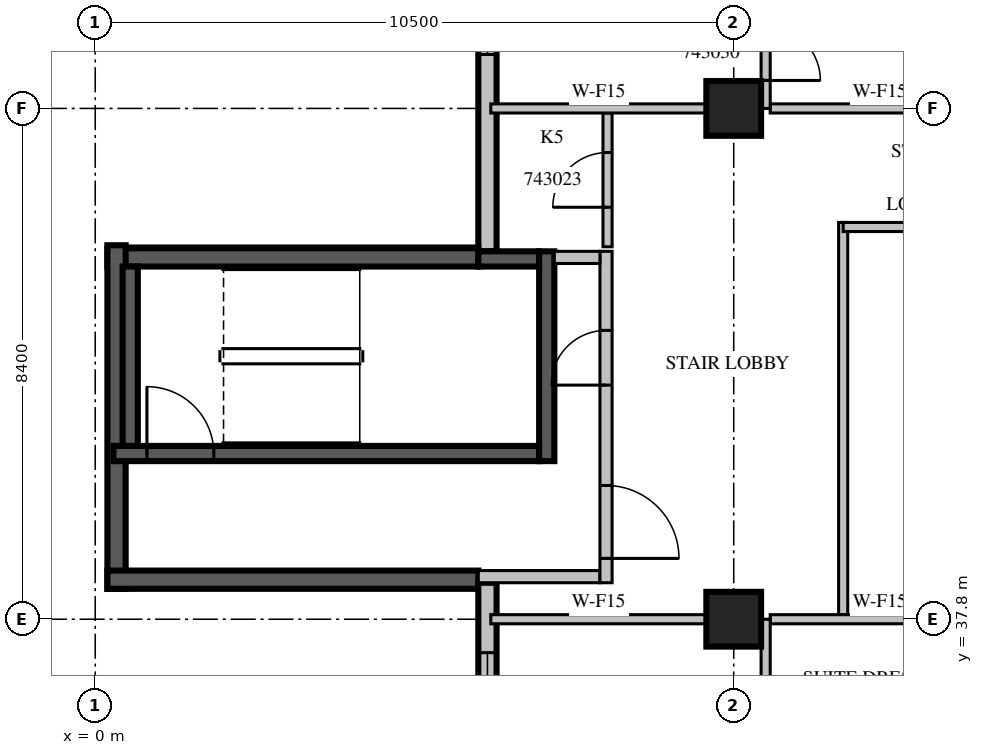
"""IFC4 building model, lengths in metres.
Left out: names, types, materials, properties, quantities, classifications, styles, units other than length and angle.
Written with IfcOpenShell. Run it as: python <this file> out.ifc"""

import sys

from ifc_helpers import new_model, si_unit, direction, frame, frame_2d, origin, origin_2d, place, context, subcontext, project, spatial, rectangle, extrude, source, transform, mapped, element, fill, save


model = new_model("IFC4")
c1 = context("Model", 3, precision=1e-05, world=origin(), true_north=direction((0.0, 1.0)))
c2 = subcontext(c1, "Body", "Model", "MODEL_VIEW")
j1 = project(units=[si_unit("LENGTHUNIT", "METRE"), si_unit("PLANEANGLEUNIT", "RADIAN")], contexts=[c1])
p1 = place(None, origin())
s1 = spatial("IfcSite", under=j1, at=p1, CompositionType="ELEMENT")
p2 = place(p1, origin())
s2 = spatial("IfcBuilding", under=s1, at=p2, CompositionType="ELEMENT")
p3 = place(p2, frame((0.0, 0.0, 196.8)))
s3 = spatial("IfcBuildingStorey", under=s2, at=p3, CompositionType="ELEMENT", Elevation=196.8)
m1 = source(origin(), c2, "Body", "SweptSolid", [
    extrude(rectangle(XDim=0.9, YDim=0.9, at=origin_2d()), origin(), (0.0, 0.0, 1.0), 3.8),
])
for number, where, z_axis, x_axis in (
    (1, (10.5, 37.8, 0.0), (0.0, 0.0, 1.0), (1.0, 0.0, 0.0)),
    (2, (10.5, 46.2, 0.0), (0.0, 0.0, 1.0), (1.0, 0.0, 0.0)),
):
    element("IfcColumn", number, at=place(p3, frame(where, z_axis=z_axis, x_axis=x_axis)), inside=s3, PredefinedType="COLUMN", context=c2, shape_type="MappedRepresentation", body=[
        mapped(m1, transform((0.0, 0.0, 0.0), scale=1.0)),
    ])
m2 = source(origin(), c2, "Body", "SweptSolid", [
    extrude(rectangle(XDim=9.91, YDim=0.3, at=frame_2d((4.955, 0.0))), origin(), (0.0, 0.0, 1.0), 3.4),
])
p4 = place(p3, frame((6.45, 53.76, 0.0), z_axis=(0.0, 0.0, 1.0), x_axis=(0.0, -1.0, 0.0)))
e3 = element("IfcWall", 3, at=p4, inside=s3, PredefinedType="STANDARD", context=c2, shape_type="MappedRepresentation", body=[
    mapped(m2, transform((0.0, 0.0, 0.0), scale=1.0)),
])
m3 = source(origin(), c2, "Body", "SweptSolid", [
    extrude(rectangle(XDim=2.4, YDim=2.3, at=frame_2d((1.2, 1.15))), frame((0.0, 0.16, 0.0), z_axis=(0.0, -1.0, 0.0), x_axis=(1.0, 0.0, 0.0)), (0.0, 0.0, 1.0), 0.32),
])
p5 = place(p4, frame((4.272, 0.0, 0.6)))
e4 = element("IfcOpeningElement", 4, at=p5, cuts=e3, PredefinedType="OPENING", context=c2, shape_type="MappedRepresentation", body=[
    mapped(m3, transform((0.0, 0.0, 0.0), scale=1.0)),
])
p6 = place(p4, frame((0.936, 0.0, 0.6)))
e5 = element("IfcOpeningElement", 5, at=p6, cuts=e3, PredefinedType="OPENING", context=c2, shape_type="MappedRepresentation", body=[
    mapped(m3, transform((0.0, 0.0, 0.0), scale=1.0)),
])
m4 = source(origin(), c2, "Body", "SweptSolid", [
    extrude(rectangle(XDim=6.1, YDim=0.3, at=frame_2d((3.05, 0.0))), origin(), (0.0, 0.0, 1.0), 3.4),
])
p7 = place(p3, frame((6.3, 43.75, 0.0), z_axis=(0.0, 0.0, 1.0), x_axis=(-1.0, 0.0, 0.0)))
e6 = element("IfcWall", 6, at=p7, inside=s3, PredefinedType="SOLIDWALL", context=c2, shape_type="MappedRepresentation", body=[
    mapped(m4, transform((0.0, 0.0, 0.0), scale=1.0)),
])
m5 = source(origin(), c2, "Body", "SweptSolid", [
    extrude(rectangle(XDim=5.65, YDim=0.3, at=frame_2d((2.825, 0.0))), origin(), (0.0, 0.0, 1.0), 3.4),
])
p8 = place(p3, frame((0.35, 43.95, 0.0), z_axis=(0.0, 0.0, 1.0), x_axis=(0.0, -1.0, 0.0)))
e7 = element("IfcWall", 7, at=p8, inside=s3, PredefinedType="SOLIDWALL", context=c2, shape_type="MappedRepresentation", body=[
    mapped(m5, transform((0.0, 0.0, 0.0), scale=1.0)),
])
p9 = place(p3, frame((0.2, 38.45, 0.0), z_axis=(0.0, 0.0, 1.0), x_axis=(1.0, 0.0, 0.0)))
e8 = element("IfcWall", 8, at=p9, inside=s3, PredefinedType="SOLIDWALL", context=c2, shape_type="MappedRepresentation", body=[
    mapped(m4, transform((0.0, 0.0, 0.0), scale=1.0)),
])
m6 = source(origin(), c2, "Body", "SweptSolid", [
    extrude(rectangle(XDim=16.6, YDim=0.3, at=frame_2d((8.3, 0.0))), origin(), (0.0, 0.0, 1.0), 3.4),
])
p10 = place(p3, frame((6.45, 38.4, 0.0), z_axis=(0.0, 0.0, 1.0), x_axis=(0.0, -1.0, 0.0)))
e9 = element("IfcWall", 9, at=p10, inside=s3, PredefinedType="STANDARD", context=c2, shape_type="MappedRepresentation", body=[
    mapped(m6, transform((0.0, 0.0, 0.0), scale=1.0)),
])
m7 = source(origin(), c2, "Body", "SweptSolid", [
    extrude(rectangle(XDim=1.8, YDim=2.3, at=frame_2d((0.9, 1.15))), frame((0.0, 0.16, 0.0), z_axis=(0.0, -1.0, 0.0), x_axis=(1.0, 0.0, 0.0)), (0.0, 0.0, 1.0), 0.32),
])
p11 = place(p10, frame((1.15, 0.0, 0.6)))
e10 = element("IfcOpeningElement", 10, at=p11, cuts=e9, PredefinedType="OPENING", context=c2, shape_type="MappedRepresentation", body=[
    mapped(m7, transform((0.0, 0.0, 0.0), scale=1.0)),
])
p12 = place(p10, frame((9.438, 0.0, 0.6)))
e11 = element("IfcOpeningElement", 11, at=p12, cuts=e9, PredefinedType="OPENING", context=c2, shape_type="MappedRepresentation", body=[
    mapped(m7, transform((0.0, 0.0, 0.0), scale=1.0)),
])
m8 = source(origin(), c2, "Body", "SweptSolid", [
    extrude(rectangle(XDim=1.2, YDim=2.3, at=frame_2d((0.6, 1.15))), frame((0.0, 0.16, 0.0), z_axis=(0.0, -1.0, 0.0), x_axis=(1.0, 0.0, 0.0)), (0.0, 0.0, 1.0), 0.32),
])
p13 = place(p10, frame((13.012, 0.0, 0.6)))
e12 = element("IfcOpeningElement", 12, at=p13, cuts=e9, PredefinedType="OPENING", context=c2, shape_type="MappedRepresentation", body=[
    mapped(m8, transform((0.0, 0.0, 0.0), scale=1.0)),
])
m9 = source(origin(), c2, "Body", "SweptSolid", [
    extrude(rectangle(XDim=1.0, YDim=2.1, at=frame_2d((0.5, 1.05))), frame((0.0, 0.16, 0.0), z_axis=(0.0, -1.0, 0.0), x_axis=(1.0, 0.0, 0.0)), (0.0, 0.0, 1.0), 0.32),
])
p14 = place(p10, frame((5.45, 0.0, 0.0)))
e13 = element("IfcOpeningElement", 13, at=p14, cuts=e9, PredefinedType="OPENING", context=c2, shape_type="MappedRepresentation", body=[
    mapped(m9, transform((0.0, 0.0, 0.0), scale=1.0)),
])
m10 = source(origin(), c2, "Body", "SweptSolid", [
    extrude(rectangle(XDim=7.0, YDim=0.25, at=frame_2d((3.5, 0.0))), origin(), (0.0, 0.0, 1.0), 3.4),
])
p15 = place(p3, frame((0.3, 40.525, 0.0), z_axis=(0.0, 0.0, 1.0), x_axis=(1.0, 0.0, 0.0)))
e14 = element("IfcWall", 14, at=p15, inside=s3, PredefinedType="SOLIDWALL", context=c2, shape_type="MappedRepresentation", body=[
    mapped(m10, transform((0.0, 0.0, 0.0), scale=1.0)),
])
m11 = source(origin(), c2, "Body", "SweptSolid", [
    extrude(rectangle(XDim=1.1, YDim=2.1, at=frame_2d((0.55, 1.05))), frame((0.0, 0.135, 0.0), z_axis=(0.0, -1.0, 0.0), x_axis=(1.0, 0.0, 0.0)), (0.0, 0.0, 1.0), 0.27),
])
p16 = place(p15, frame((0.55, 0.0, 0.0)))
e15 = element("IfcOpeningElement", 15, at=p16, cuts=e14, PredefinedType="OPENING", context=c2, shape_type="MappedRepresentation", body=[
    mapped(m11, transform((0.0, 0.0, 0.0), scale=1.0)),
])
m12 = source(origin(), c2, "Body", "SweptSolid", [
    extrude(rectangle(XDim=1.0, YDim=0.25, at=frame_2d((0.5, 0.0))), origin(), (0.0, 0.0, 1.0), 3.4),
])
p17 = place(p3, frame((6.3, 43.725, 0.0), z_axis=(0.0, 0.0, 1.0), x_axis=(1.0, 0.0, 0.0)))
e16 = element("IfcWall", 16, at=p17, inside=s3, PredefinedType="SOLIDWALL", context=c2, shape_type="MappedRepresentation", body=[
    mapped(m12, transform((0.0, 0.0, 0.0), scale=1.0)),
])
m13 = source(origin(), c2, "Body", "SweptSolid", [
    extrude(rectangle(XDim=3.45, YDim=0.25, at=frame_2d((1.725, 0.0))), origin(), (0.0, 0.0, 1.0), 3.4),
])
p18 = place(p3, frame((7.425, 40.4, 0.0), z_axis=(0.0, 0.0, 1.0), x_axis=(0.0, 1.0, 0.0)))
e17 = element("IfcWall", 17, at=p18, inside=s3, PredefinedType="SOLIDWALL", context=c2, shape_type="MappedRepresentation", body=[
    mapped(m13, transform((0.0, 0.0, 0.0), scale=1.0)),
])
m14 = source(origin(), c2, "Body", "SweptSolid", [
    extrude(rectangle(XDim=2.95, YDim=0.25, at=frame_2d((1.475, 0.0))), origin(), (0.0, 0.0, 1.0), 3.4),
])
p19 = place(p3, frame((0.575, 40.65, 0.0), z_axis=(0.0, 0.0, 1.0), x_axis=(0.0, 1.0, 0.0)))
e18 = element("IfcWall", 18, at=p19, inside=s3, PredefinedType="SOLIDWALL", context=c2, shape_type="MappedRepresentation", body=[
    mapped(m14, transform((0.0, 0.0, 0.0), scale=1.0)),
])
m15 = source(origin(), c2, "Body", "SweptSolid", [
    extrude(rectangle(XDim=2.0, YDim=0.2, at=frame_2d((1.0, 0.0))), origin(), (0.0, 0.0, 1.0), 3.4),
])
p20 = place(p3, frame((6.3, 38.5, 0.0), z_axis=(0.0, 0.0, 1.0), x_axis=(1.0, 0.0, 0.0)))
e19 = element("IfcWall", 19, at=p20, inside=s3, PredefinedType="PARTITIONING", context=c2, shape_type="MappedRepresentation", body=[
    mapped(m15, transform((0.0, 0.0, 0.0), scale=1.0)),
])
m16 = source(origin(), c2, "Body", "SweptSolid", [
    extrude(rectangle(XDim=5.45, YDim=0.2, at=frame_2d((2.725, 0.0))), origin(), (0.0, 0.0, 1.0), 3.4),
])
p21 = place(p3, frame((8.4, 38.4, 0.0), z_axis=(0.0, 0.0, 1.0), x_axis=(0.0, 1.0, 0.0)))
e20 = element("IfcWall", 20, at=p21, inside=s3, PredefinedType="PARTITIONING", context=c2, shape_type="MappedRepresentation", body=[
    mapped(m16, transform((0.0, 0.0, 0.0), scale=1.0)),
])
m17 = source(origin(), c2, "Body", "SweptSolid", [
    extrude(rectangle(XDim=1.2, YDim=2.1, at=frame_2d((0.6, 1.05))), frame((0.0, 0.11, 0.0), z_axis=(0.0, -1.0, 0.0), x_axis=(1.0, 0.0, 0.0)), (0.0, 0.0, 1.0), 0.22),
])
p22 = place(p21, frame((0.4, 0.0, 0.0)))
e21 = element("IfcOpeningElement", 21, at=p22, cuts=e20, PredefinedType="OPENING", context=c2, shape_type="MappedRepresentation", body=[
    mapped(m17, transform((0.0, 0.0, 0.0), scale=1.0)),
])
m18 = source(origin(), c2, "Body", "SweptSolid", [
    extrude(rectangle(XDim=0.9, YDim=2.1, at=frame_2d((0.45, 1.05))), frame((0.0, 0.11, 0.0), z_axis=(0.0, -1.0, 0.0), x_axis=(1.0, 0.0, 0.0)), (0.0, 0.0, 1.0), 0.22),
])
p23 = place(p21, frame((3.25, 0.0, 0.0)))
e22 = element("IfcOpeningElement", 22, at=p23, cuts=e20, PredefinedType="OPENING", context=c2, shape_type="MappedRepresentation", body=[
    mapped(m18, transform((0.0, 0.0, 0.0), scale=1.0)),
])
m19 = source(origin(), c2, "Body", "SweptSolid", [
    extrude(rectangle(XDim=0.75, YDim=0.2, at=frame_2d((0.375, 0.0))), origin(), (0.0, 0.0, 1.0), 3.4),
])
p24 = place(p3, frame((7.55, 43.75, 0.0), z_axis=(0.0, 0.0, 1.0), x_axis=(1.0, 0.0, 0.0)))
e23 = element("IfcWall", 23, at=p24, inside=s3, PredefinedType="PARTITIONING", context=c2, shape_type="MappedRepresentation", body=[
    mapped(m19, transform((0.0, 0.0, 0.0), scale=1.0)),
])
m20 = source(origin(), c2, "Body", "SweptSolid", [
    extrude(rectangle(XDim=6.45, YDim=0.15, at=frame_2d((3.225, 0.0))), origin(), (0.0, 0.0, 1.0), 3.4),
])
p25 = place(p3, frame((12.3, 44.325, 0.0), z_axis=(0.0, 0.0, 1.0), x_axis=(0.0, -1.0, 0.0)))
e24 = element("IfcWall", 24, at=p25, inside=s3, PredefinedType="PARTITIONING", context=c2, shape_type="MappedRepresentation", body=[
    mapped(m20, transform((0.0, 0.0, 0.0), scale=1.0)),
])
m21 = source(origin(), c2, "Body", "SweptSolid", [
    extrude(rectangle(XDim=2.475, YDim=0.15, at=frame_2d((1.238, 0.0))), origin(), (0.0, 0.0, 1.0), 3.4),
])
p26 = place(p3, frame((14.775, 44.25, 0.0), z_axis=(0.0, 0.0, 1.0), x_axis=(-1.0, 0.0, 0.0)))
e25 = element("IfcWall", 25, at=p26, inside=s3, PredefinedType="PARTITIONING", context=c2, shape_type="MappedRepresentation", body=[
    mapped(m21, transform((0.0, 0.0, 0.0), scale=1.0)),
])
m22 = source(origin(), c2, "Body", "SweptSolid", [
    extrude(rectangle(XDim=2.2, YDim=0.15, at=frame_2d((1.1, 0.0))), origin(), (0.0, 0.0, 1.0), 3.4),
])
p27 = place(p3, frame((8.425, 43.925, 0.0), z_axis=(0.0, 0.0, 1.0), x_axis=(0.0, 1.0, 0.0)))
e26 = element("IfcWall", 26, at=p27, inside=s3, PredefinedType="PARTITIONING", context=c2, shape_type="MappedRepresentation", body=[
    mapped(m22, transform((0.0, 0.0, 0.0), scale=1.0)),
])
m23 = source(origin(), c2, "Body", "SweptSolid", [
    extrude(rectangle(XDim=0.9, YDim=2.1, at=frame_2d((0.45, 1.05))), frame((0.0, 0.085, 0.0), z_axis=(0.0, -1.0, 0.0), x_axis=(1.0, 0.0, 0.0)), (0.0, 0.0, 1.0), 0.17),
])
p28 = place(p27, frame((0.65, 0.0, 0.0)))
e27 = element("IfcOpeningElement", 27, at=p28, cuts=e26, PredefinedType="OPENING", context=c2, shape_type="MappedRepresentation", body=[
    mapped(m23, transform((0.0, 0.0, 0.0), scale=1.0)),
])
m24 = source(origin(), c2, "Body", "SweptSolid", [
    extrude(rectangle(XDim=3.546, YDim=0.15, at=frame_2d((1.773, 0.0))), origin(), (0.0, 0.0, 1.0), 3.4),
])
p29 = place(p3, frame((10.051, 37.8, 0.0), z_axis=(0.0, 0.0, 1.0), x_axis=(-1.0, 0.0, 0.0)))
e28 = element("IfcWall", 28, at=p29, inside=s3, PredefinedType="PARTITIONING", context=c2, shape_type="MappedRepresentation", body=[
    mapped(m24, transform((0.0, 0.0, 0.0), scale=1.0)),
])
m25 = source(origin(), c2, "Body", "SweptSolid", [
    extrude(rectangle(XDim=3.6, YDim=0.15, at=frame_2d((1.8, 0.0))), origin(), (0.0, 0.0, 1.0), 3.4),
])
p30 = place(p3, frame((14.7, 37.8, 0.0), z_axis=(0.0, 0.0, 1.0), x_axis=(-1.0, 0.0, 0.0)))
e29 = element("IfcWall", 29, at=p30, inside=s3, PredefinedType="PARTITIONING", context=c2, shape_type="MappedRepresentation", body=[
    mapped(m25, transform((0.0, 0.0, 0.0), scale=1.0)),
])
m26 = source(origin(), c2, "Body", "SweptSolid", [
    extrude(rectangle(XDim=8.4, YDim=0.15, at=frame_2d((4.2, 0.0))), origin(), (0.0, 0.0, 1.0), 3.4),
])
p31 = place(p3, frame((11.025, 29.4, 0.0), z_axis=(0.0, 0.0, 1.0), x_axis=(0.0, 1.0, 0.0)))
e30 = element("IfcWall", 30, at=p31, inside=s3, PredefinedType="PARTITIONING", context=c2, shape_type="MappedRepresentation", body=[
    mapped(m26, transform((0.0, 0.0, 0.0), scale=1.0)),
])
m27 = source(origin(), c2, "Body", "SweptSolid", [
    extrude(rectangle(XDim=1.1, YDim=2.1, at=frame_2d((0.55, 1.05))), frame((0.0, 0.085, 0.0), z_axis=(0.0, -1.0, 0.0), x_axis=(1.0, 0.0, 0.0)), (0.0, 0.0, 1.0), 0.17),
])
p32 = place(p31, frame((0.876, 0.0, 0.0)))
e31 = element("IfcOpeningElement", 31, at=p32, cuts=e30, PredefinedType="OPENING", context=c2, shape_type="MappedRepresentation", body=[
    mapped(m27, transform((0.0, 0.0, 0.0), scale=1.0)),
])
p33 = place(p31, frame((3.38, 0.0, 0.0)))
e32 = element("IfcOpeningElement", 32, at=p33, cuts=e30, PredefinedType="OPENING", context=c2, shape_type="MappedRepresentation", body=[
    mapped(m23, transform((0.0, 0.0, 0.0), scale=1.0)),
])
p34 = place(p31, frame((6.154, 0.0, 0.0)))
e33 = element("IfcOpeningElement", 33, at=p34, cuts=e30, PredefinedType="OPENING", context=c2, shape_type="MappedRepresentation", body=[
    mapped(m23, transform((0.0, 0.0, 0.0), scale=1.0)),
])
p35 = place(p3, frame((10.051, 46.2, 0.0), z_axis=(0.0, 0.0, 1.0), x_axis=(-1.0, 0.0, 0.0)))
e34 = element("IfcWall", 34, at=p35, inside=s3, PredefinedType="PARTITIONING", context=c2, shape_type="MappedRepresentation", body=[
    mapped(m24, transform((0.0, 0.0, 0.0), scale=1.0)),
])
p36 = place(p3, frame((14.7, 46.2, 0.0), z_axis=(0.0, 0.0, 1.0), x_axis=(-1.0, 0.0, 0.0)))
e35 = element("IfcWall", 35, at=p36, inside=s3, PredefinedType="PARTITIONING", context=c2, shape_type="MappedRepresentation", body=[
    mapped(m25, transform((0.0, 0.0, 0.0), scale=1.0)),
])
m28 = source(origin(), c2, "Body", "SweptSolid", [
    extrude(rectangle(XDim=7.26, YDim=0.15, at=frame_2d((3.63, 0.0))), origin(), (0.0, 0.0, 1.0), 3.4),
])
p37 = place(p3, frame((11.025, 46.2, 0.0), z_axis=(0.0, 0.0, 1.0), x_axis=(0.0, 1.0, 0.0)))
e36 = element("IfcWall", 36, at=p37, inside=s3, PredefinedType="PARTITIONING", context=c2, shape_type="MappedRepresentation", body=[
    mapped(m28, transform((0.0, 0.0, 0.0), scale=1.0)),
])
p38 = place(p37, frame((1.412, 0.0, 0.0)))
e37 = element("IfcOpeningElement", 37, at=p38, cuts=e36, PredefinedType="OPENING", context=c2, shape_type="MappedRepresentation", body=[
    mapped(m23, transform((0.0, 0.0, 0.0), scale=1.0)),
])
p39 = place(p37, frame((0.46, 0.0, 0.0)))
e38 = element("IfcOpeningElement", 38, at=p39, cuts=e36, PredefinedType="OPENING", context=c2, shape_type="MappedRepresentation", body=[
    mapped(m23, transform((0.0, 0.0, 0.0), scale=1.0)),
])
p40 = place(p37, frame((3.901, 0.0, 0.0)))
e39 = element("IfcOpeningElement", 39, at=p40, cuts=e36, PredefinedType="OPENING", context=c2, shape_type="MappedRepresentation", body=[
    mapped(m23, transform((0.0, 0.0, 0.0), scale=1.0)),
])
m29 = source(origin(), c2, "Body", "SweptSolid", [
    extrude(rectangle(XDim=2.4, YDim=2.3, at=frame_2d((1.2, 1.15))), frame((0.0, 0.03, 0.0), z_axis=(0.0, -1.0, 0.0), x_axis=(1.0, 0.0, 0.0)), (0.0, 0.0, 1.0), 0.06),
])
p41 = place(p5, origin())
e40 = element("IfcWindow", 40, at=p41, inside=s3, PartitioningType="SINGLE_PANEL", PredefinedType="WINDOW", context=c2, shape_type="MappedRepresentation", body=[
    mapped(m29, transform((0.0, 0.0, 0.0), scale=1.0)),
])
fill(e4, e40)
m30 = source(origin(), c2, "Body", "SweptSolid", [
    extrude(rectangle(XDim=1.8, YDim=2.3, at=frame_2d((0.9, 1.15))), frame((0.0, 0.03, 0.0), z_axis=(0.0, -1.0, 0.0), x_axis=(1.0, 0.0, 0.0)), (0.0, 0.0, 1.0), 0.06),
])
p42 = place(p11, origin())
e41 = element("IfcWindow", 41, at=p42, inside=s3, PartitioningType="SINGLE_PANEL", PredefinedType="WINDOW", context=c2, shape_type="MappedRepresentation", body=[
    mapped(m30, transform((0.0, 0.0, 0.0), scale=1.0)),
])
fill(e10, e41)
m31 = source(origin(), c2, "Body", "SweptSolid", [
    extrude(rectangle(XDim=1.1, YDim=2.1, at=frame_2d((0.55, 1.05))), frame((0.0, 0.025, 0.0), z_axis=(0.0, -1.0, 0.0), x_axis=(1.0, 0.0, 0.0)), (0.0, 0.0, 1.0), 0.05),
])
p43 = place(p16, origin())
e42 = element("IfcDoor", 42, at=p43, inside=s3, OperationType="SINGLE_SWING_LEFT", PredefinedType="DOOR", context=c2, shape_type="MappedRepresentation", body=[
    mapped(m31, transform((0.0, 0.0, 0.0), scale=1.0)),
])
fill(e15, e42)
m32 = source(origin(), c2, "Body", "SweptSolid", [
    extrude(rectangle(XDim=1.2, YDim=2.1, at=frame_2d((0.6, 1.05))), frame((0.0, 0.025, 0.0), z_axis=(0.0, -1.0, 0.0), x_axis=(1.0, 0.0, 0.0)), (0.0, 0.0, 1.0), 0.05),
])
p44 = place(p22, origin())
e43 = element("IfcDoor", 43, at=p44, inside=s3, OperationType="SINGLE_SWING_RIGHT", PredefinedType="DOOR", context=c2, shape_type="MappedRepresentation", body=[
    mapped(m32, transform((0.0, 0.0, 0.0), scale=1.0)),
])
fill(e21, e43)
m33 = source(origin(), c2, "Body", "SweptSolid", [
    extrude(rectangle(XDim=0.9, YDim=2.1, at=frame_2d((0.45, 1.05))), frame((0.0, 0.025, 0.0), z_axis=(0.0, -1.0, 0.0), x_axis=(1.0, 0.0, 0.0)), (0.0, 0.0, 1.0), 0.05),
])
p45 = place(p23, origin())
e44 = element("IfcDoor", 44, at=p45, inside=s3, OperationType="SINGLE_SWING_LEFT", PredefinedType="DOOR", context=c2, shape_type="MappedRepresentation", body=[
    mapped(m33, transform((0.0, 0.0, 0.0), scale=1.0)),
])
fill(e22, e44)
p46 = place(p28, origin())
e45 = element("IfcDoor", 45, at=p46, inside=s3, OperationType="SINGLE_SWING_LEFT", PredefinedType="DOOR", context=c2, shape_type="MappedRepresentation", body=[
    mapped(m33, transform((0.0, 0.0, 0.0), scale=1.0)),
])
fill(e27, e45)
p47 = place(p39, origin())
e46 = element("IfcDoor", 46, at=p47, inside=s3, OperationType="SINGLE_SWING_RIGHT", PredefinedType="DOOR", context=c2, shape_type="MappedRepresentation", body=[
    mapped(m33, transform((0.0, 0.0, 0.0), scale=1.0)),
])
fill(e38, e46)
save(model, sys.argv[1])
